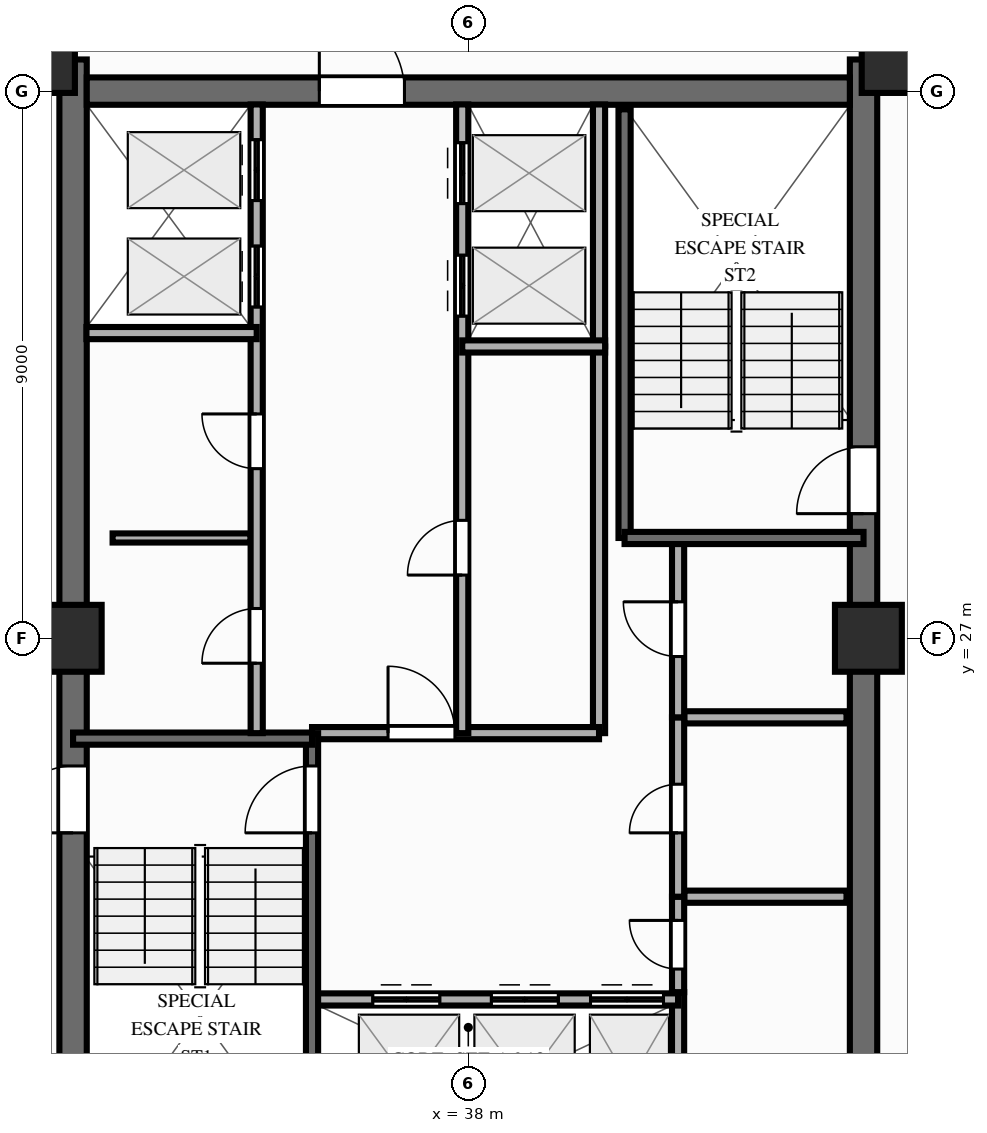
"""IFC4 building model, lengths in metres.
Left out: names, types, materials, properties, quantities, classifications, styles, units other than length and angle.
Written with IfcOpenShell. Run it as: python <this file> out.ifc"""

import sys

from ifc_helpers import new_model, si_unit, direction, frame, frame_2d, origin, origin_2d, place, context, subcontext, project, spatial, rectangle, extrude, source, transform, mapped, element, fill, save


model = new_model("IFC4")
c1 = context("Model", 3, precision=1e-05, world=origin(), true_north=direction((0.0, 1.0)))
c2 = subcontext(c1, "Body", "Model", "MODEL_VIEW")
j1 = project(units=[si_unit("LENGTHUNIT", "METRE"), si_unit("PLANEANGLEUNIT", "RADIAN")], contexts=[c1])
p1 = place(None, origin())
s1 = spatial("IfcSite", under=j1, at=p1, CompositionType="ELEMENT")
p2 = place(p1, origin())
s2 = spatial("IfcBuilding", under=s1, at=p2, CompositionType="ELEMENT")
p3 = place(p2, frame((0.0, 0.0, 199.6)))
s3 = spatial("IfcBuildingStorey", under=s2, at=p3, CompositionType="ELEMENT", Elevation=199.6)
p4 = place(p3, frame((31.5, 17.48, 0.0), z_axis=(0.0, 0.0, 1.0), x_axis=(0.0, 1.0, 0.0)))
e1 = element("IfcWall", 1, at=p4, inside=s3, PredefinedType="SHEAR", context=c2, shape_type="SweptSolid", body=[
    extrude(rectangle(XDim=19.04, YDim=0.45, at=frame_2d((9.52, 0.0))), origin(), (0.0, 0.0, 1.0), 3.0),
])
p5 = place(p4, frame((6.32, 0.0, 0.0)))
e2 = element("IfcOpeningElement", 2, at=p5, cuts=e1, PredefinedType="OPENING", context=c2, shape_type="SweptSolid", body=[
    extrude(rectangle(XDim=1.1, YDim=2.15, at=frame_2d((0.55, 1.075))), frame((0.0, 0.237, 0.0), z_axis=(0.0, -1.0, 0.0), x_axis=(1.0, 0.0, 0.0)), (0.0, 0.0, 1.0), 0.474),
])
p6 = place(p3, frame((44.5, 17.48, 0.0), z_axis=(0.0, 0.0, 1.0), x_axis=(0.0, 1.0, 0.0)))
e3 = element("IfcWall", 3, at=p6, inside=s3, PredefinedType="SHEAR", context=c2, shape_type="SweptSolid", body=[
    extrude(rectangle(XDim=19.04, YDim=0.45, at=frame_2d((9.52, 0.0))), origin(), (0.0, 0.0, 1.0), 3.0),
])
p7 = place(p6, frame((12.67, 0.0, 0.0), z_axis=(0.0, 0.0, 1.0), x_axis=(-1.0, 0.0, 0.0)))
e4 = element("IfcOpeningElement", 4, at=p7, cuts=e3, PredefinedType="OPENING", context=c2, shape_type="SweptSolid", body=[
    extrude(rectangle(XDim=1.1, YDim=2.15, at=frame_2d((0.55, 1.075))), frame((0.0, 0.237, 0.0), z_axis=(0.0, -1.0, 0.0), x_axis=(1.0, 0.0, 0.0)), (0.0, 0.0, 1.0), 0.474),
])
p8 = place(p3, frame((31.725, 36.0, 0.0), z_axis=(0.0, 0.0, 1.0), x_axis=(1.0, 0.0, 0.0)))
e5 = element("IfcWall", 5, at=p8, inside=s3, PredefinedType="SHEAR", context=c2, shape_type="SweptSolid", body=[
    extrude(rectangle(XDim=12.55, YDim=0.45, at=frame_2d((6.275, 0.0))), origin(), (0.0, 0.0, 1.0), 3.0),
])
p9 = place(p8, frame((5.225, 0.0, 0.0), z_axis=(0.0, 0.0, 1.0), x_axis=(-1.0, 0.0, 0.0)))
e6 = element("IfcOpeningElement", 6, at=p9, cuts=e5, PredefinedType="OPENING", context=c2, shape_type="SweptSolid", body=[
    extrude(rectangle(XDim=1.4, YDim=2.15, at=frame_2d((0.7, 1.075))), frame((0.0, 0.237, 0.0), z_axis=(0.0, -1.0, 0.0), x_axis=(1.0, 0.0, 0.0)), (0.0, 0.0, 1.0), 0.474),
])
m1 = source(origin(), c2, "Body", "SweptSolid", [
    extrude(rectangle(XDim=1.1, YDim=1.1, at=origin_2d()), origin(), (0.0, 0.0, 1.0), 3.0),
])
for number, where, z_axis, x_axis in (
    (7, (30.98, 36.52, 0.0), (0.0, 0.0, 1.0), (1.0, 0.0, 0.0)),
    (8, (45.02, 36.52, 0.0), (0.0, 0.0, 1.0), (1.0, 0.0, 0.0)),
    (9, (31.42, 27.0, 0.0), (0.0, 0.0, 1.0), (1.0, 0.0, 0.0)),
    (10, (44.58, 27.0, 0.0), (0.0, 0.0, 1.0), (1.0, 0.0, 0.0)),
):
    element("IfcColumn", number, at=place(p3, frame(where, z_axis=z_axis, x_axis=x_axis)), inside=s3, PredefinedType="COLUMN", context=c2, shape_type="MappedRepresentation", body=[
        mapped(m1, transform((0.0, 0.0, 0.0), scale=1.0)),
    ])
p10 = place(p3, frame((32.15, 28.65, 0.0), z_axis=(0.0, 0.0, 1.0), x_axis=(1.0, 0.0, 0.0)))
e11 = element("IfcWall", 11, at=p10, inside=s3, PredefinedType="PARTITIONING", context=c2, shape_type="SweptSolid", body=[
    extrude(rectangle(XDim=2.27, YDim=0.15, at=frame_2d((1.135, 0.0))), origin(), (0.0, 0.0, 1.0), 2.14),
])
p11 = place(p3, frame((41.55, 22.75, 0.0), z_axis=(0.0, 0.0, 1.0), x_axis=(1.0, 0.0, 0.0)))
e12 = element("IfcWall", 12, at=p11, inside=s3, PredefinedType="PARTITIONING", context=c2, shape_type="SweptSolid", body=[
    extrude(rectangle(XDim=2.67, YDim=0.2, at=frame_2d((1.335, 0.0))), origin(), (0.0, 0.0, 1.0), 2.79),
])
p12 = place(p3, frame((41.55, 25.7, 0.0), z_axis=(0.0, 0.0, 1.0), x_axis=(1.0, 0.0, 0.0)))
e13 = element("IfcWall", 13, at=p12, inside=s3, PredefinedType="PARTITIONING", context=c2, shape_type="SweptSolid", body=[
    extrude(rectangle(XDim=2.67, YDim=0.2, at=frame_2d((1.335, 0.0))), origin(), (0.0, 0.0, 1.0), 2.14),
])
p13 = place(p3, frame((41.45, 18.22, 0.0), z_axis=(0.0, 0.0, 1.0), x_axis=(0.0, 1.0, 0.0)))
e14 = element("IfcWall", 14, at=p13, inside=s3, PredefinedType="PARTITIONING", context=c2, shape_type="SweptSolid", body=[
    extrude(rectangle(XDim=2.96, YDim=0.2, at=frame_2d((1.48, 0.0))), origin(), (0.0, 0.0, 1.0), 2.79),
])
p14 = place(p3, frame((41.45, 21.18, 0.0), z_axis=(0.0, 0.0, 1.0), x_axis=(0.0, 1.0, 0.0)))
e15 = element("IfcWall", 15, at=p14, inside=s3, PredefinedType="PARTITIONING", context=c2, shape_type="SweptSolid", body=[
    extrude(rectangle(XDim=1.57, YDim=0.2, at=frame_2d((0.785, 0.0))), origin(), (0.0, 0.0, 1.0), 2.79),
])
p15 = place(p14, frame((0.38, 0.0, 0.0)))
e16 = element("IfcOpeningElement", 16, at=p15, cuts=e15, PredefinedType="OPENING", context=c2, shape_type="SweptSolid", body=[
    extrude(rectangle(XDim=0.8, YDim=2.05, at=frame_2d((0.4, 1.025))), frame((0.0, 0.112, 0.0), z_axis=(0.0, -1.0, 0.0), x_axis=(1.0, 0.0, 0.0)), (0.0, 0.0, 1.0), 0.224),
])
p16 = place(p3, frame((41.45, 22.75, 0.0), z_axis=(0.0, 0.0, 1.0), x_axis=(0.0, 1.0, 0.0)))
e17 = element("IfcWall", 17, at=p16, inside=s3, PredefinedType="PARTITIONING", context=c2, shape_type="SweptSolid", body=[
    extrude(rectangle(XDim=2.95, YDim=0.2, at=frame_2d((1.475, 0.0))), origin(), (0.0, 0.0, 1.0), 2.79),
])
p17 = place(p16, frame((1.05, 0.0, 0.0)))
e18 = element("IfcOpeningElement", 18, at=p17, cuts=e17, PredefinedType="OPENING", context=c2, shape_type="SweptSolid", body=[
    extrude(rectangle(XDim=0.8, YDim=2.05, at=frame_2d((0.4, 1.025))), frame((0.0, 0.112, 0.0), z_axis=(0.0, -1.0, 0.0), x_axis=(1.0, 0.0, 0.0)), (0.0, 0.0, 1.0), 0.224),
])
p18 = place(p3, frame((41.45, 25.7, 0.0), z_axis=(0.0, 0.0, 1.0), x_axis=(0.0, 1.0, 0.0)))
e19 = element("IfcWall", 19, at=p18, inside=s3, PredefinedType="PARTITIONING", context=c2, shape_type="SweptSolid", body=[
    extrude(rectangle(XDim=2.9, YDim=0.2, at=frame_2d((1.45, 0.0))), origin(), (0.0, 0.0, 1.0), 2.79),
])
p19 = place(p18, frame((1.0, 0.0, 0.0)))
e20 = element("IfcOpeningElement", 20, at=p19, cuts=e19, PredefinedType="OPENING", context=c2, shape_type="SweptSolid", body=[
    extrude(rectangle(XDim=0.9, YDim=2.1, at=frame_2d((0.45, 1.05))), frame((0.0, 0.112, 0.0), z_axis=(0.0, -1.0, 0.0), x_axis=(1.0, 0.0, 0.0)), (0.0, 0.0, 1.0), 0.224),
])
p20 = place(p3, frame((40.15, 25.44, 0.0), z_axis=(0.0, 0.0, 1.0), x_axis=(0.0, 1.0, 0.0)))
e21 = element("IfcWall", 21, at=p20, inside=s3, PredefinedType="PARTITIONING", context=c2, shape_type="SweptSolid", body=[
    extrude(rectangle(XDim=6.36, YDim=0.2, at=frame_2d((3.18, 0.0))), origin(), (0.0, 0.0, 1.0), 2.79),
])
p21 = place(p3, frame((40.15, 31.8, 0.0), z_axis=(0.0, 0.0, 1.0), x_axis=(0.0, 1.0, 0.0)))
e22 = element("IfcWall", 22, at=p21, inside=s3, PredefinedType="PARTITIONING", context=c2, shape_type="SweptSolid", body=[
    extrude(rectangle(XDim=3.98, YDim=0.2, at=frame_2d((1.99, 0.0))), origin(), (0.0, 0.0, 1.0), 2.79),
])
p22 = place(p3, frame((35.43, 21.06, 0.0), z_axis=(0.0, 0.0, 1.0), x_axis=(1.0, 0.0, 0.0)))
e23 = element("IfcWall", 23, at=p22, inside=s3, PredefinedType="PARTITIONING", context=c2, shape_type="SweptSolid", body=[
    extrude(rectangle(XDim=6.02, YDim=0.2, at=frame_2d((3.01, 0.0))), origin(), (0.0, 0.0, 1.0), 2.79),
])
p23 = place(p22, frame((1.0, 0.0, 0.0)))
e24 = element("IfcOpeningElement", 24, at=p23, cuts=e23, PredefinedType="OPENING", context=c2, shape_type="SweptSolid", body=[
    extrude(rectangle(XDim=1.1, YDim=2.15, at=frame_2d((0.55, 1.075))), frame((0.0, 0.112, 0.0), z_axis=(0.0, -1.0, 0.0), x_axis=(1.0, 0.0, 0.0)), (0.0, 0.0, 1.0), 0.224),
])
p24 = place(p22, frame((2.95, 0.0, 0.0)))
e25 = element("IfcOpeningElement", 25, at=p24, cuts=e23, PredefinedType="OPENING", context=c2, shape_type="SweptSolid", body=[
    extrude(rectangle(XDim=1.1, YDim=2.15, at=frame_2d((0.55, 1.075))), frame((0.0, 0.112, 0.0), z_axis=(0.0, -1.0, 0.0), x_axis=(1.0, 0.0, 0.0)), (0.0, 0.0, 1.0), 0.224),
])
p25 = place(p22, frame((4.58, 0.0, 0.0)))
e26 = element("IfcOpeningElement", 26, at=p25, cuts=e23, PredefinedType="OPENING", context=c2, shape_type="SweptSolid", body=[
    extrude(rectangle(XDim=1.2, YDim=2.15, at=frame_2d((0.6, 1.075))), frame((0.0, 0.112, 0.0), z_axis=(0.0, -1.0, 0.0), x_axis=(1.0, 0.0, 0.0)), (0.0, 0.0, 1.0), 0.224),
])
p26 = place(p3, frame((35.43, 25.44, 0.0), z_axis=(0.0, 0.0, 1.0), x_axis=(1.0, 0.0, 0.0)))
e27 = element("IfcWall", 27, at=p26, inside=s3, PredefinedType="PARTITIONING", context=c2, shape_type="SweptSolid", body=[
    extrude(rectangle(XDim=4.72, YDim=0.2, at=frame_2d((2.36, 0.0))), origin(), (0.0, 0.0, 1.0), 2.79),
])
p27 = place(p26, frame((1.25, 0.0, 0.0)))
e28 = element("IfcOpeningElement", 28, at=p27, cuts=e27, PredefinedType="OPENING", context=c2, shape_type="SweptSolid", body=[
    extrude(rectangle(XDim=1.1, YDim=2.15, at=frame_2d((0.55, 1.075))), frame((0.0, 0.112, 0.0), z_axis=(0.0, -1.0, 0.0), x_axis=(1.0, 0.0, 0.0)), (0.0, 0.0, 1.0), 0.224),
])
p28 = place(p3, frame((35.43, 18.22, 0.0), z_axis=(0.0, 0.0, 1.0), x_axis=(0.0, 1.0, 0.0)))
e29 = element("IfcWall", 29, at=p28, inside=s3, PredefinedType="SOLIDWALL", context=c2, shape_type="SweptSolid", body=[
    extrude(rectangle(XDim=7.22, YDim=0.2, at=frame_2d((3.61, 0.0))), origin(), (0.0, 0.0, 1.0), 2.79),
])
p29 = place(p28, frame((6.68, 0.0, 0.0), z_axis=(0.0, 0.0, 1.0), x_axis=(-1.0, 0.0, 0.0)))
e30 = element("IfcOpeningElement", 30, at=p29, cuts=e29, PredefinedType="OPENING", context=c2, shape_type="SweptSolid", body=[
    extrude(rectangle(XDim=1.1, YDim=2.15, at=frame_2d((0.55, 1.075))), frame((0.0, 0.112, 0.0), z_axis=(0.0, -1.0, 0.0), x_axis=(1.0, 0.0, 0.0)), (0.0, 0.0, 1.0), 0.224),
])
p30 = place(p3, frame((31.5, 25.35, 0.0), z_axis=(0.0, 0.0, 1.0), x_axis=(1.0, 0.0, 0.0)))
e31 = element("IfcWall", 31, at=p30, inside=s3, PredefinedType="SOLIDWALL", context=c2, shape_type="SweptSolid", body=[
    extrude(rectangle(XDim=3.93, YDim=0.2, at=frame_2d((1.965, 0.0))), origin(), (0.0, 0.0, 1.0), 2.79),
])
p31 = place(p3, frame((40.57, 28.65, 0.0), z_axis=(0.0, 0.0, 1.0), x_axis=(0.0, 1.0, 0.0)))
e32 = element("IfcWall", 32, at=p31, inside=s3, PredefinedType="SOLIDWALL", context=c2, shape_type="SweptSolid", body=[
    extrude(rectangle(XDim=7.05, YDim=0.2, at=frame_2d((3.525, 0.0))), origin(), (0.0, 0.0, 1.0), 2.79),
])
p32 = place(p3, frame((40.57, 28.65, 0.0), z_axis=(0.0, 0.0, 1.0), x_axis=(1.0, 0.0, 0.0)))
e33 = element("IfcWall", 33, at=p32, inside=s3, PredefinedType="SOLIDWALL", context=c2, shape_type="SweptSolid", body=[
    extrude(rectangle(XDim=3.93, YDim=0.2, at=frame_2d((1.965, 0.0))), origin(), (0.0, 0.0, 1.0), 2.79),
])
p33 = place(p3, frame((34.52, 25.44, 0.0), z_axis=(0.0, 0.0, 1.0), x_axis=(0.0, 1.0, 0.0)))
e34 = element("IfcWall", 34, at=p33, inside=s3, PredefinedType="PARTITIONING", context=c2, shape_type="SweptSolid", body=[
    extrude(rectangle(XDim=10.34, YDim=0.2, at=frame_2d((5.17, 0.0))), origin(), (0.0, 0.0, 1.0), 2.79),
])
p34 = place(p33, frame((1.15, 0.0, 0.0)))
e35 = element("IfcOpeningElement", 35, at=p34, cuts=e34, PredefinedType="OPENING", context=c2, shape_type="SweptSolid", body=[
    extrude(rectangle(XDim=0.9, YDim=2.1, at=frame_2d((0.45, 1.05))), frame((0.0, 0.112, 0.0), z_axis=(0.0, -1.0, 0.0), x_axis=(1.0, 0.0, 0.0)), (0.0, 0.0, 1.0), 0.224),
])
p35 = place(p33, frame((4.35, 0.0, 0.0)))
e36 = element("IfcOpeningElement", 36, at=p35, cuts=e34, PredefinedType="OPENING", context=c2, shape_type="SweptSolid", body=[
    extrude(rectangle(XDim=0.9, YDim=2.1, at=frame_2d((0.45, 1.05))), frame((0.0, 0.112, 0.0), z_axis=(0.0, -1.0, 0.0), x_axis=(1.0, 0.0, 0.0)), (0.0, 0.0, 1.0), 0.224),
])
p36 = place(p33, frame((7.01, 0.0, 0.0)))
e37 = element("IfcOpeningElement", 37, at=p36, cuts=e34, PredefinedType="OPENING", context=c2, shape_type="SweptSolid", body=[
    extrude(rectangle(XDim=1.0, YDim=2.15, at=frame_2d((0.5, 1.075))), frame((0.0, 0.112, 0.0), z_axis=(0.0, -1.0, 0.0), x_axis=(1.0, 0.0, 0.0)), (0.0, 0.0, 1.0), 0.224),
])
p37 = place(p33, frame((8.76, 0.0, 0.0)))
e38 = element("IfcOpeningElement", 38, at=p37, cuts=e34, PredefinedType="OPENING", context=c2, shape_type="SweptSolid", body=[
    extrude(rectangle(XDim=1.0, YDim=2.15, at=frame_2d((0.5, 1.075))), frame((0.0, 0.112, 0.0), z_axis=(0.0, -1.0, 0.0), x_axis=(1.0, 0.0, 0.0)), (0.0, 0.0, 1.0), 0.224),
])
p38 = place(p3, frame((31.72, 32.02, 0.0), z_axis=(0.0, 0.0, 1.0), x_axis=(1.0, 0.0, 0.0)))
e39 = element("IfcWall", 39, at=p38, inside=s3, PredefinedType="PARTITIONING", context=c2, shape_type="SweptSolid", body=[
    extrude(rectangle(XDim=2.8, YDim=0.2, at=frame_2d((1.4, 0.0))), origin(), (0.0, 0.0, 1.0), 2.79),
])
p39 = place(p3, frame((37.9, 25.44, 0.0), z_axis=(0.0, 0.0, 1.0), x_axis=(0.0, 1.0, 0.0)))
e40 = element("IfcWall", 40, at=p39, inside=s3, PredefinedType="PARTITIONING", context=c2, shape_type="SweptSolid", body=[
    extrude(rectangle(XDim=10.34, YDim=0.2, at=frame_2d((5.17, 0.0))), origin(), (0.0, 0.0, 1.0), 2.79),
])
p40 = place(p39, frame((2.6, 0.0, 0.0)))
e41 = element("IfcOpeningElement", 41, at=p40, cuts=e40, PredefinedType="OPENING", context=c2, shape_type="SweptSolid", body=[
    extrude(rectangle(XDim=0.9, YDim=2.1, at=frame_2d((0.45, 1.05))), frame((0.0, 0.112, 0.0), z_axis=(0.0, -1.0, 0.0), x_axis=(1.0, 0.0, 0.0)), (0.0, 0.0, 1.0), 0.224),
])
p41 = place(p39, frame((6.86, 0.0, 0.0)))
e42 = element("IfcOpeningElement", 42, at=p41, cuts=e40, PredefinedType="OPENING", context=c2, shape_type="SweptSolid", body=[
    extrude(rectangle(XDim=1.0, YDim=2.15, at=frame_2d((0.5, 1.075))), frame((0.0, 0.112, 0.0), z_axis=(0.0, -1.0, 0.0), x_axis=(1.0, 0.0, 0.0)), (0.0, 0.0, 1.0), 0.224),
])
p42 = place(p39, frame((8.71, 0.0, 0.0)))
e43 = element("IfcOpeningElement", 43, at=p42, cuts=e40, PredefinedType="OPENING", context=c2, shape_type="SweptSolid", body=[
    extrude(rectangle(XDim=1.0, YDim=2.15, at=frame_2d((0.5, 1.075))), frame((0.0, 0.112, 0.0), z_axis=(0.0, -1.0, 0.0), x_axis=(1.0, 0.0, 0.0)), (0.0, 0.0, 1.0), 0.224),
])
p43 = place(p3, frame((37.9, 31.8, 0.0), z_axis=(0.0, 0.0, 1.0), x_axis=(1.0, 0.0, 0.0)))
e44 = element("IfcWall", 44, at=p43, inside=s3, PredefinedType="PARTITIONING", context=c2, shape_type="SweptSolid", body=[
    extrude(rectangle(XDim=2.35, YDim=0.2, at=frame_2d((1.175, 0.0))), origin(), (0.0, 0.0, 1.0), 2.79),
])
m2 = source(origin(), c2, "Body", "SweptSolid", [
    extrude(rectangle(XDim=1.1, YDim=2.15, at=frame_2d((0.55, 1.075))), frame((0.0, 0.025, 0.0), z_axis=(0.0, -1.0, 0.0), x_axis=(1.0, 0.0, 0.0)), (0.0, 0.0, 1.0), 0.05),
])
p44 = place(p5, origin())
e45 = element("IfcDoor", 45, at=p44, inside=s3, OperationType="SINGLE_SWING_LEFT", PredefinedType="DOOR", context=c2, shape_type="MappedRepresentation", body=[
    mapped(m2, transform((0.0, 0.0, 0.0), scale=1.0)),
])
fill(e2, e45)
p45 = place(p7, origin())
e46 = element("IfcDoor", 46, at=p45, inside=s3, OperationType="SINGLE_SWING_RIGHT", PredefinedType="DOOR", context=c2, shape_type="MappedRepresentation", body=[
    mapped(m2, transform((0.0, 0.0, 0.0), scale=1.0)),
])
fill(e4, e46)
m3 = source(origin(), c2, "Body", "SweptSolid", [
    extrude(rectangle(XDim=1.4, YDim=2.15, at=frame_2d((0.7, 1.075))), frame((0.0, 0.025, 0.0), z_axis=(0.0, -1.0, 0.0), x_axis=(1.0, 0.0, 0.0)), (0.0, 0.0, 1.0), 0.05),
])
p46 = place(p9, origin())
e47 = element("IfcDoor", 47, at=p46, inside=s3, OperationType="SINGLE_SWING_RIGHT", PredefinedType="DOOR", context=c2, shape_type="MappedRepresentation", body=[
    mapped(m3, transform((0.0, 0.0, 0.0), scale=1.0)),
])
fill(e6, e47)
m4 = source(origin(), c2, "Body", "SweptSolid", [
    extrude(rectangle(XDim=0.8, YDim=2.05, at=frame_2d((0.4, 1.025))), frame((0.0, 0.025, 0.0), z_axis=(0.0, -1.0, 0.0), x_axis=(1.0, 0.0, 0.0)), (0.0, 0.0, 1.0), 0.05),
])
p47 = place(p15, origin())
e48 = element("IfcDoor", 48, at=p47, inside=s3, OperationType="SINGLE_SWING_RIGHT", PredefinedType="DOOR", context=c2, shape_type="MappedRepresentation", body=[
    mapped(m4, transform((0.0, 0.0, 0.0), scale=1.0)),
])
fill(e16, e48)
p48 = place(p17, origin())
e49 = element("IfcDoor", 49, at=p48, inside=s3, OperationType="SINGLE_SWING_LEFT", PredefinedType="DOOR", context=c2, shape_type="MappedRepresentation", body=[
    mapped(m4, transform((0.0, 0.0, 0.0), scale=1.0)),
])
fill(e18, e49)
m5 = source(origin(), c2, "Body", "SweptSolid", [
    extrude(rectangle(XDim=0.9, YDim=2.1, at=frame_2d((0.45, 1.05))), frame((0.0, 0.025, 0.0), z_axis=(0.0, -1.0, 0.0), x_axis=(1.0, 0.0, 0.0)), (0.0, 0.0, 1.0), 0.05),
])
p49 = place(p19, origin())
e50 = element("IfcDoor", 50, at=p49, inside=s3, OperationType="SINGLE_SWING_RIGHT", PredefinedType="DOOR", context=c2, shape_type="MappedRepresentation", body=[
    mapped(m5, transform((0.0, 0.0, 0.0), scale=1.0)),
])
fill(e20, e50)
p50 = place(p23, origin())
e51 = element("IfcDoor", 51, at=p50, inside=s3, OperationType="DOUBLE_DOOR_SLIDING", PredefinedType="DOOR", context=c2, shape_type="MappedRepresentation", body=[
    mapped(m2, transform((0.0, 0.0, 0.0), scale=1.0)),
])
fill(e24, e51)
p51 = place(p24, origin())
e52 = element("IfcDoor", 52, at=p51, inside=s3, OperationType="DOUBLE_DOOR_SLIDING", PredefinedType="DOOR", context=c2, shape_type="MappedRepresentation", body=[
    mapped(m2, transform((0.0, 0.0, 0.0), scale=1.0)),
])
fill(e25, e52)
m6 = source(origin(), c2, "Body", "SweptSolid", [
    extrude(rectangle(XDim=1.2, YDim=2.15, at=frame_2d((0.6, 1.075))), frame((0.0, 0.025, 0.0), z_axis=(0.0, -1.0, 0.0), x_axis=(1.0, 0.0, 0.0)), (0.0, 0.0, 1.0), 0.05),
])
p52 = place(p25, origin())
e53 = element("IfcDoor", 53, at=p52, inside=s3, OperationType="DOUBLE_DOOR_SLIDING", PredefinedType="DOOR", context=c2, shape_type="MappedRepresentation", body=[
    mapped(m6, transform((0.0, 0.0, 0.0), scale=1.0)),
])
fill(e26, e53)
p53 = place(p27, origin())
e54 = element("IfcDoor", 54, at=p53, inside=s3, OperationType="SINGLE_SWING_LEFT", PredefinedType="DOOR", context=c2, shape_type="MappedRepresentation", body=[
    mapped(m2, transform((0.0, 0.0, 0.0), scale=1.0)),
])
fill(e28, e54)
p54 = place(p29, origin())
e55 = element("IfcDoor", 55, at=p54, inside=s3, OperationType="SINGLE_SWING_RIGHT", PredefinedType="DOOR", context=c2, shape_type="MappedRepresentation", body=[
    mapped(m2, transform((0.0, 0.0, 0.0), scale=1.0)),
])
fill(e30, e55)
p55 = place(p34, origin())
e56 = element("IfcDoor", 56, at=p55, inside=s3, OperationType="SINGLE_SWING_LEFT", PredefinedType="DOOR", context=c2, shape_type="MappedRepresentation", body=[
    mapped(m5, transform((0.0, 0.0, 0.0), scale=1.0)),
])
fill(e35, e56)
p56 = place(p35, origin())
e57 = element("IfcDoor", 57, at=p56, inside=s3, OperationType="SINGLE_SWING_RIGHT", PredefinedType="DOOR", context=c2, shape_type="MappedRepresentation", body=[
    mapped(m5, transform((0.0, 0.0, 0.0), scale=1.0)),
])
fill(e36, e57)
m7 = source(origin(), c2, "Body", "SweptSolid", [
    extrude(rectangle(XDim=1.0, YDim=2.15, at=frame_2d((0.5, 1.075))), frame((0.0, 0.025, 0.0), z_axis=(0.0, -1.0, 0.0), x_axis=(1.0, 0.0, 0.0)), (0.0, 0.0, 1.0), 0.05),
])
p57 = place(p36, origin())
e58 = element("IfcDoor", 58, at=p57, inside=s3, OperationType="DOUBLE_DOOR_SLIDING", PredefinedType="DOOR", context=c2, shape_type="MappedRepresentation", body=[
    mapped(m7, transform((0.0, 0.0, 0.0), scale=1.0)),
])
fill(e37, e58)
p58 = place(p37, origin())
e59 = element("IfcDoor", 59, at=p58, inside=s3, OperationType="DOUBLE_DOOR_SLIDING", PredefinedType="DOOR", context=c2, shape_type="MappedRepresentation", body=[
    mapped(m7, transform((0.0, 0.0, 0.0), scale=1.0)),
])
fill(e38, e59)
p59 = place(p40, origin())
e60 = element("IfcDoor", 60, at=p59, inside=s3, OperationType="SINGLE_SWING_LEFT", PredefinedType="DOOR", context=c2, shape_type="MappedRepresentation", body=[
    mapped(m5, transform((0.0, 0.0, 0.0), scale=1.0)),
])
fill(e41, e60)
p60 = place(p41, origin())
e61 = element("IfcDoor", 61, at=p60, inside=s3, OperationType="DOUBLE_DOOR_SLIDING", PredefinedType="DOOR", context=c2, shape_type="MappedRepresentation", body=[
    mapped(m7, transform((0.0, 0.0, 0.0), scale=1.0)),
])
fill(e42, e61)
p61 = place(p42, origin())
e62 = element("IfcDoor", 62, at=p61, inside=s3, OperationType="DOUBLE_DOOR_SLIDING", PredefinedType="DOOR", context=c2, shape_type="MappedRepresentation", body=[
    mapped(m7, transform((0.0, 0.0, 0.0), scale=1.0)),
])
fill(e43, e62)
save(model, sys.argv[1])
